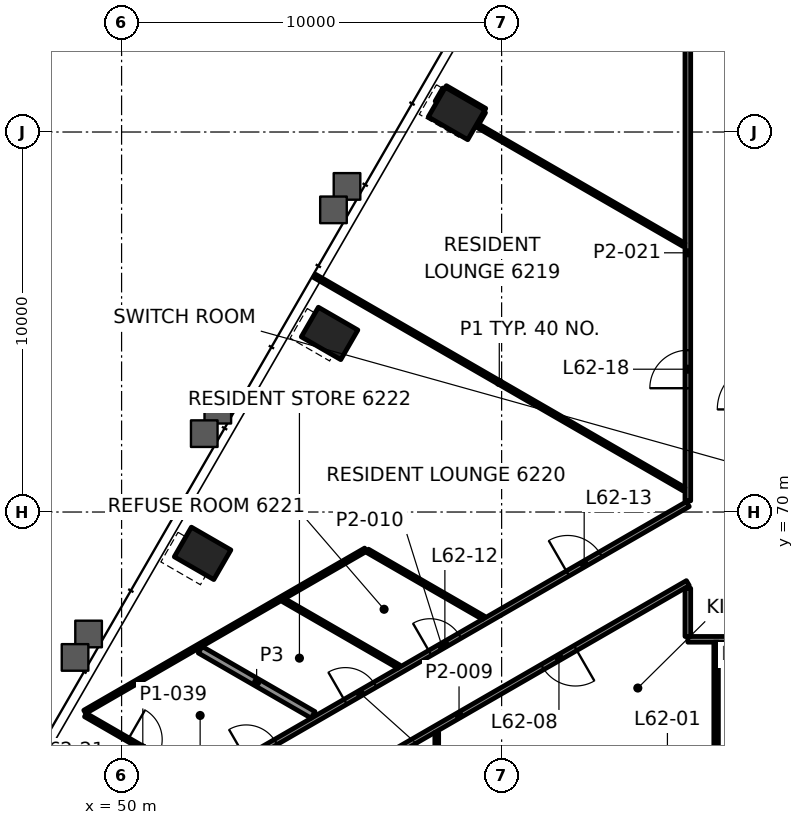
"""IFC4 building model, lengths in metres.
Left out: names, types, materials, properties, quantities, classifications, styles, units other than length and angle.
Written with IfcOpenShell. Run it as: python <this file> out.ifc"""

import sys

from ifc_helpers import new_model, si_unit, direction, frame, frame_2d, origin, origin_2d, place, context, subcontext, project, spatial, rectangle, hollow_rectangle, extrude, element, fill, save


model = new_model("IFC4")
c1 = context("Model", 3, precision=1e-05, world=origin(), true_north=direction((0.0, 1.0)))
c2 = subcontext(c1, "Body", "Model", "MODEL_VIEW")
j1 = project(units=[si_unit("LENGTHUNIT", "METRE"), si_unit("PLANEANGLEUNIT", "RADIAN")], contexts=[c1])
p1 = place(None, origin())
s1 = spatial("IfcSite", under=j1, at=p1, CompositionType="ELEMENT")
p2 = place(p1, origin())
s2 = spatial("IfcBuilding", under=s1, at=p2, CompositionType="ELEMENT")
p3 = place(p2, frame((0.0, 0.0, 263.6)))
s3 = spatial("IfcBuildingStorey", under=s2, at=p3, CompositionType="ELEMENT", Elevation=263.6)
for number, where, z_axis, x_axis in (
    (1, (58.814, 80.487, -0.0), (0.0, 0.0, 1.0), (-0.5, -0.866, 0.0)),
    (2, (55.473, 74.699, -0.0), (0.0, 0.0, 1.0), (-0.5, -0.866, 0.0)),
    (3, (52.131, 68.912, -0.0), (0.0, 0.0, 1.0), (-0.5, -0.866, 0.0)),
):
    element("IfcColumn", number, at=place(p3, frame(where, z_axis=z_axis, x_axis=x_axis)), inside=s3, PredefinedType="COLUMN", context=c2, shape_type="SweptSolid", body=[
        extrude(hollow_rectangle(XDim=0.9, YDim=1.2, WallThickness=0.06, at=origin_2d()), origin(), (0.0, 0.0, 1.0), 3.5),
    ])
p4 = place(p3, frame((85.1, 66.65, 0.0), z_axis=(0.0, 0.0, 1.0), x_axis=(-1.0, 0.0, 0.0)))
e4 = element("IfcWall", 4, at=p4, inside=s3, PredefinedType="PARTITIONING", context=c2, shape_type="SweptSolid", body=[
    extrude(rectangle(XDim=20.2, YDim=0.15, at=frame_2d((10.1, 0.0))), origin(), (0.0, 0.0, 1.0), 2.7),
])
p5 = place(p4, frame((1.61, 0.0, 0.0)))
e5 = element("IfcOpeningElement", 5, at=p5, cuts=e4, PredefinedType="OPENING", context=c2, shape_type="SweptSolid", body=[
    extrude(rectangle(XDim=1.0, YDim=2.1, at=frame_2d((0.5, 1.05))), frame((0.0, 0.085, 0.0), z_axis=(0.0, -1.0, 0.0), x_axis=(1.0, 0.0, 0.0)), (0.0, 0.0, 1.0), 0.17),
])
p6 = place(p4, frame((8.229, 0.0, 0.0)))
e6 = element("IfcOpeningElement", 6, at=p6, cuts=e4, PredefinedType="OPENING", context=c2, shape_type="SweptSolid", body=[
    extrude(rectangle(XDim=1.0, YDim=2.1, at=frame_2d((0.5, 1.05))), frame((0.0, 0.085, 0.0), z_axis=(0.0, -1.0, 0.0), x_axis=(1.0, 0.0, 0.0)), (0.0, 0.0, 1.0), 0.17),
])
p7 = place(p3, frame((64.9, 68.13, 0.0), z_axis=(0.0, 0.0, 1.0), x_axis=(-0.866020369651, -0.500008719273, 0.0)))
e7 = element("IfcWall", 7, at=p7, inside=s3, PredefinedType="PARTITIONING", context=c2, shape_type="SweptSolid", body=[
    extrude(rectangle(XDim=13.904, YDim=0.15, at=frame_2d((6.952, 0.0))), origin(), (0.0, 0.0, 1.0), 2.547),
])
p8 = place(p7, frame((3.416, 0.0, 0.0)))
e8 = element("IfcOpeningElement", 8, at=p8, cuts=e7, PredefinedType="OPENING", context=c2, shape_type="SweptSolid", body=[
    extrude(rectangle(XDim=1.0, YDim=2.1, at=frame_2d((0.5, 1.05))), frame((0.0, 0.085, 0.0), z_axis=(0.0, -1.0, 0.0), x_axis=(1.0, 0.0, 0.0)), (0.0, 0.0, 1.0), 0.17),
])
p9 = place(p7, frame((10.215, 0.0, 0.0)))
e9 = element("IfcOpeningElement", 9, at=p9, cuts=e7, PredefinedType="OPENING", context=c2, shape_type="SweptSolid", body=[
    extrude(rectangle(XDim=0.9, YDim=2.1, at=frame_2d((0.45, 1.05))), frame((0.0, 0.085, 0.0), z_axis=(0.0, -1.0, 0.0), x_axis=(1.0, 0.0, 0.0)), (0.0, 0.0, 1.0), 0.17),
])
p10 = place(p3, frame((51.959, 62.736, 0.0), z_axis=(0.0, 0.0, 1.0), x_axis=(0.866022614424, 0.500004831283, 0.0)))
e10 = element("IfcWall", 10, at=p10, inside=s3, PredefinedType="PARTITIONING", context=c2, shape_type="SweptSolid", body=[
    extrude(rectangle(XDim=14.943, YDim=0.15, at=frame_2d((7.472, 0.0))), origin(), (0.0, 0.0, 1.0), 2.7),
])
p11 = place(p10, frame((1.522, 0.0, 0.0)))
e11 = element("IfcOpeningElement", 11, at=p11, cuts=e10, PredefinedType="OPENING", context=c2, shape_type="SweptSolid", body=[
    extrude(rectangle(XDim=0.9, YDim=2.1, at=frame_2d((0.45, 1.05))), frame((0.0, 0.085, 0.0), z_axis=(0.0, -1.0, 0.0), x_axis=(1.0, 0.0, 0.0)), (0.0, 0.0, 1.0), 0.17),
])
p12 = place(p10, frame((4.539, 0.0, 0.0)))
e12 = element("IfcOpeningElement", 12, at=p12, cuts=e10, PredefinedType="OPENING", context=c2, shape_type="SweptSolid", body=[
    extrude(rectangle(XDim=0.9, YDim=2.1, at=frame_2d((0.45, 1.05))), frame((0.0, 0.085, 0.0), z_axis=(0.0, -1.0, 0.0), x_axis=(1.0, 0.0, 0.0)), (0.0, 0.0, 1.0), 0.17),
])
p13 = place(p10, frame((7.111, 0.0, 0.0)))
e13 = element("IfcOpeningElement", 13, at=p13, cuts=e10, PredefinedType="OPENING", context=c2, shape_type="SweptSolid", body=[
    extrude(rectangle(XDim=0.9, YDim=2.1, at=frame_2d((0.45, 1.05))), frame((0.0, 0.085, 0.0), z_axis=(0.0, -1.0, 0.0), x_axis=(1.0, 0.0, 0.0)), (0.0, 0.0, 1.0), 0.17),
])
p14 = place(p10, frame((11.294, 0.0, 0.0)))
e14 = element("IfcOpeningElement", 14, at=p14, cuts=e10, PredefinedType="OPENING", context=c2, shape_type="SweptSolid", body=[
    extrude(rectangle(XDim=1.0, YDim=2.1, at=frame_2d((0.5, 1.05))), frame((0.0, 0.085, 0.0), z_axis=(0.0, -1.0, 0.0), x_axis=(1.0, 0.0, 0.0)), (0.0, 0.0, 1.0), 0.17),
])
p15 = place(p3, frame((49.03, 64.741, 0.0), z_axis=(0.0, 0.0, 1.0), x_axis=(0.866019796467, 0.500009712033, 0.0)))
e15 = element("IfcWall", 15, at=p15, inside=s3, PredefinedType="PARTITIONING", context=c2, shape_type="SweptSolid", body=[
    extrude(rectangle(XDim=8.534, YDim=0.1, at=frame_2d((4.267, 0.0))), origin(), (0.0, 0.0, 1.0), 2.7),
])
p16 = place(p3, frame((59.359, 80.23, 0.0), z_axis=(0.0, 0.0, 1.0), x_axis=(0.499539972301, 0.866290838041, 0.0)))
e16 = element("IfcWall", 16, at=p16, inside=s3, PredefinedType="PARTITIONING", context=c2, shape_type="SweptSolid", body=[
    extrude(rectangle(XDim=0.347, YDim=0.1, at=frame_2d((0.174, 0.0))), origin(), (0.0, 0.0, 1.0), 2.7),
])
p17 = place(p3, frame((58.294, 80.787, 0.0), z_axis=(0.0, 0.0, 1.0), x_axis=(0.500165123728, 0.865930048564, 0.0)))
e17 = element("IfcWall", 17, at=p17, inside=s3, PredefinedType="PARTITIONING", context=c2, shape_type="SweptSolid", body=[
    extrude(rectangle(XDim=0.398, YDim=0.1, at=frame_2d((0.199, 0.0))), origin(), (0.0, 0.0, 1.0), 2.7),
])
p18 = place(p3, frame((65.644, 66.575, 0.0), z_axis=(0.0, 0.0, 1.0), x_axis=(0.0, -1.0, 0.0)))
e18 = element("IfcWall", 18, at=p18, inside=s3, PredefinedType="PARTITIONING", context=c2, shape_type="SweptSolid", body=[
    extrude(rectangle(XDim=9.436, YDim=0.12, at=frame_2d((4.718, 0.0))), origin(), (0.0, 0.0, 1.0), 2.688),
])
p19 = place(p18, frame((5.38, 0.0, 0.0)))
e19 = element("IfcOpeningElement", 19, at=p19, cuts=e18, PredefinedType="OPENING", context=c2, shape_type="SweptSolid", body=[
    extrude(rectangle(XDim=0.9, YDim=2.1, at=frame_2d((0.45, 1.05))), frame((0.0, 0.07, 0.0), z_axis=(0.0, -1.0, 0.0), x_axis=(1.0, 0.0, 0.0)), (0.0, 0.0, 1.0), 0.14),
])
p20 = place(p3, frame((64.9, 66.725, 0.0), z_axis=(0.0, 0.0, 1.0), x_axis=(0.0, 1.0, 0.0)))
e20 = element("IfcWall", 20, at=p20, inside=s3, PredefinedType="PARTITIONING", context=c2, shape_type="SweptSolid", body=[
    extrude(rectangle(XDim=1.268, YDim=0.15, at=frame_2d((0.634, 0.0))), origin(), (0.0, 0.0, 1.0), 2.547),
])
p21 = place(p3, frame((64.9, 70.295, 0.0), z_axis=(0.0, 0.0, 1.0), x_axis=(0.0, 1.0, 0.0)))
e21 = element("IfcWall", 21, at=p21, inside=s3, PredefinedType="PARTITIONING", context=c2, shape_type="SweptSolid", body=[
    extrude(rectangle(XDim=13.053, YDim=0.15, at=frame_2d((6.527, 0.0))), origin(), (0.0, 0.0, 1.0), 2.7),
])
p22 = place(p21, frame((2.963, 0.0, 0.0)))
e22 = element("IfcOpeningElement", 22, at=p22, cuts=e21, PredefinedType="OPENING", context=c2, shape_type="SweptSolid", body=[
    extrude(rectangle(XDim=1.0, YDim=2.1, at=frame_2d((0.5, 1.05))), frame((0.0, 0.085, 0.0), z_axis=(0.0, -1.0, 0.0), x_axis=(1.0, 0.0, 0.0)), (0.0, 0.0, 1.0), 0.17),
])
p23 = place(p3, frame((59.557, 80.578, 0.0), z_axis=(0.0, 0.0, 1.0), x_axis=(-0.866035997947, 0.499981649923, 0.0)))
e23 = element("IfcWall", 23, at=p23, inside=s3, PredefinedType="PARTITIONING", context=c2, shape_type="SweptSolid", body=[
    extrude(rectangle(XDim=1.196, YDim=0.1, at=frame_2d((0.598, 0.0))), origin(), (0.0, 0.0, 1.0), 2.688),
])
p24 = place(p3, frame((64.799, 77.032, 0.0), z_axis=(0.0, 0.0, 1.0), x_axis=(-0.866032246126, 0.49998814853, 0.0)))
e24 = element("IfcWall", 24, at=p24, inside=s3, PredefinedType="PARTITIONING", context=c2, shape_type="SweptSolid", body=[
    extrude(rectangle(XDim=6.31, YDim=0.1, at=frame_2d((3.155, 0.0))), origin(), (0.0, 0.0, 1.0), 2.7),
])
p25 = place(p3, frame((64.799, 70.601, 0.0), z_axis=(0.0, 0.0, 1.0), x_axis=(-0.86602224969, 0.500005463012, 0.0)))
e25 = element("IfcWall", 25, at=p25, inside=s3, PredefinedType="PARTITIONING", context=c2, shape_type="SweptSolid", body=[
    extrude(rectangle(XDim=11.226, YDim=0.1, at=frame_2d((5.613, 0.0))), origin(), (0.0, 0.0, 1.0), 2.688),
])
p26 = place(p3, frame((59.52, 67.219, 0.0), z_axis=(0.0, 0.0, 1.0), x_axis=(-0.866011216541, 0.500024572222, 0.0)))
e26 = element("IfcWall", 26, at=p26, inside=s3, PredefinedType="PARTITIONING", context=c2, shape_type="SweptSolid", body=[
    extrude(rectangle(XDim=3.521, YDim=0.1, at=frame_2d((1.76, 0.0))), origin(), (0.0, 0.0, 1.0), 2.7),
])
p27 = place(p3, frame((57.292, 65.932, 0.0), z_axis=(0.0, 0.0, 1.0), x_axis=(-0.866017863565, 0.500013059815, 0.0)))
e27 = element("IfcWall", 27, at=p27, inside=s3, PredefinedType="PARTITIONING", context=c2, shape_type="SweptSolid", body=[
    extrude(rectangle(XDim=3.491, YDim=0.1, at=frame_2d((1.745, 0.0))), origin(), (0.0, 0.0, 1.0), 2.7),
])
p28 = place(p3, frame((55.039, 64.662, 0.0), z_axis=(0.0, 0.0, 1.0), x_axis=(-0.866036273972, 0.49998117181, 0.0)))
e28 = element("IfcWall", 28, at=p28, inside=s3, PredefinedType="PARTITIONING", context=c2, shape_type="SweptSolid", body=[
    extrude(rectangle(XDim=3.431, YDim=0.2, at=frame_2d((1.715, 0.0))), origin(), (0.0, 0.0, 1.0), 2.7),
])
p29 = place(p3, frame((49.049, 64.658, 0.0), z_axis=(0.0, 0.0, 1.0), x_axis=(0.866031592922, -0.499989279946, 0.0)))
e29 = element("IfcWall", 29, at=p29, inside=s3, PredefinedType="PARTITIONING", context=c2, shape_type="SweptSolid", body=[
    extrude(rectangle(XDim=3.485, YDim=0.1, at=frame_2d((1.742, 0.0))), origin(), (0.0, 0.0, 1.0), 2.7),
])
p30 = place(p29, frame((1.292, 0.0, 0.0)))
e30 = element("IfcOpeningElement", 30, at=p30, cuts=e29, PredefinedType="OPENING", context=c2, shape_type="SweptSolid", body=[
    extrude(rectangle(XDim=0.9, YDim=2.1, at=frame_2d((0.45, 1.05))), frame((0.0, 0.06, 0.0), z_axis=(0.0, -1.0, 0.0), x_axis=(1.0, 0.0, 0.0)), (0.0, 0.0, 1.0), 0.12),
])
p31 = place(p3, frame((58.293, 60.938, 0.0), z_axis=(0.0, 0.0, 1.0), x_axis=(0.0, 1.0, 0.0)))
e31 = element("IfcWall", 31, at=p31, inside=s3, PredefinedType="PARTITIONING", context=c2, shape_type="SweptSolid", body=[
    extrude(rectangle(XDim=3.261, YDim=0.1, at=frame_2d((1.63, 0.0))), origin(), (0.0, 0.0, 1.0), 2.7),
])
p32 = place(p8, origin())
e32 = element("IfcDoor", 32, at=p32, inside=s3, OperationType="SINGLE_SWING_RIGHT", PredefinedType="DOOR", context=c2, shape_type="SweptSolid", body=[
    extrude(rectangle(XDim=1.0, YDim=2.1, at=frame_2d((0.5, 1.05))), frame((0.0, 0.025, 0.0), z_axis=(0.0, -1.0, 0.0), x_axis=(1.0, 0.0, 0.0)), (0.0, 0.0, 1.0), 0.05),
])
fill(e8, e32)
p33 = place(p11, origin())
e33 = element("IfcDoor", 33, at=p33, inside=s3, OperationType="SINGLE_SWING_RIGHT", PredefinedType="DOOR", context=c2, shape_type="SweptSolid", body=[
    extrude(rectangle(XDim=0.9, YDim=2.1, at=frame_2d((0.45, 1.05))), frame((0.0, 0.025, 0.0), z_axis=(0.0, -1.0, 0.0), x_axis=(1.0, 0.0, 0.0)), (0.0, 0.0, 1.0), 0.05),
])
fill(e11, e33)
p34 = place(p12, origin())
e34 = element("IfcDoor", 34, at=p34, inside=s3, OperationType="SINGLE_SWING_LEFT", PredefinedType="DOOR", context=c2, shape_type="SweptSolid", body=[
    extrude(rectangle(XDim=0.9, YDim=2.1, at=frame_2d((0.45, 1.05))), frame((0.0, 0.025, 0.0), z_axis=(0.0, -1.0, 0.0), x_axis=(1.0, 0.0, 0.0)), (0.0, 0.0, 1.0), 0.05),
])
fill(e12, e34)
p35 = place(p13, origin())
e35 = element("IfcDoor", 35, at=p35, inside=s3, OperationType="SINGLE_SWING_RIGHT", PredefinedType="DOOR", context=c2, shape_type="SweptSolid", body=[
    extrude(rectangle(XDim=0.9, YDim=2.1, at=frame_2d((0.45, 1.05))), frame((0.0, 0.025, 0.0), z_axis=(0.0, -1.0, 0.0), x_axis=(1.0, 0.0, 0.0)), (0.0, 0.0, 1.0), 0.05),
])
fill(e13, e35)
p36 = place(p14, origin())
e36 = element("IfcDoor", 36, at=p36, inside=s3, OperationType="SINGLE_SWING_LEFT", PredefinedType="DOOR", context=c2, shape_type="SweptSolid", body=[
    extrude(rectangle(XDim=1.0, YDim=2.1, at=frame_2d((0.5, 1.05))), frame((0.0, 0.025, 0.0), z_axis=(0.0, -1.0, 0.0), x_axis=(1.0, 0.0, 0.0)), (0.0, 0.0, 1.0), 0.05),
])
fill(e14, e36)
p37 = place(p22, origin())
e37 = element("IfcDoor", 37, at=p37, inside=s3, OperationType="SINGLE_SWING_RIGHT", PredefinedType="DOOR", context=c2, shape_type="SweptSolid", body=[
    extrude(rectangle(XDim=1.0, YDim=2.1, at=frame_2d((0.5, 1.05))), frame((0.0, 0.025, 0.0), z_axis=(0.0, -1.0, 0.0), x_axis=(1.0, 0.0, 0.0)), (0.0, 0.0, 1.0), 0.05),
])
fill(e22, e37)
p38 = place(p30, origin())
e38 = element("IfcDoor", 38, at=p38, inside=s3, OperationType="SINGLE_SWING_RIGHT", PredefinedType="DOOR", context=c2, shape_type="SweptSolid", body=[
    extrude(rectangle(XDim=0.9, YDim=2.1, at=frame_2d((0.45, 1.05))), frame((0.0, 0.025, 0.0), z_axis=(0.0, -1.0, 0.0), x_axis=(1.0, 0.0, 0.0)), (0.0, 0.0, 1.0), 0.05),
])
fill(e30, e38)
save(model, sys.argv[1])
